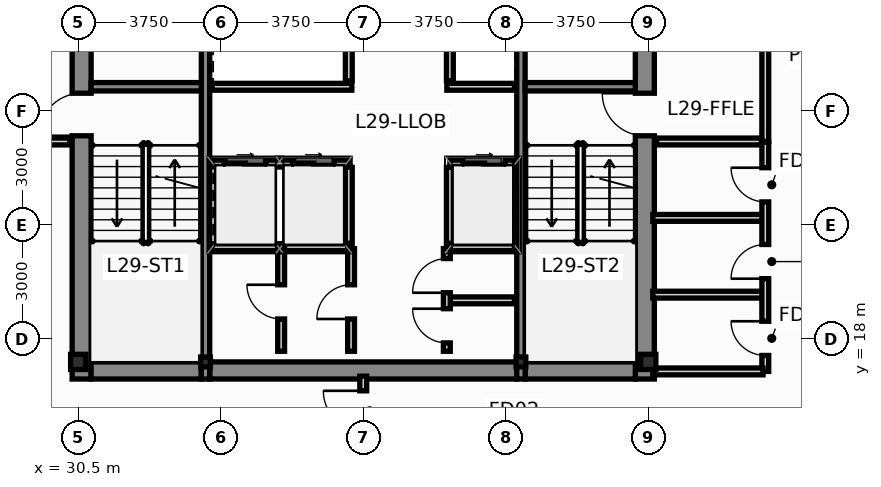
"""IFC4 building model, lengths in metres.
Left out: names, types, materials, properties, quantities, classifications, styles, units other than length and angle.
Written with IfcOpenShell. Run it as: python <this file> out.ifc"""

import sys

from ifc_helpers import new_model, si_unit, direction, frame, frame_2d, origin, origin_2d, place, context, subcontext, project, spatial, rectangle, i_section, extrude, source, transform, mapped, element, fill, save


model = new_model("IFC4")
c1 = context("Model", 3, precision=1e-05, world=origin(), true_north=direction((0.0, 1.0)))
c2 = subcontext(c1, "Body", "Model", "MODEL_VIEW")
j1 = project(units=[si_unit("LENGTHUNIT", "METRE"), si_unit("PLANEANGLEUNIT", "RADIAN")], contexts=[c1])
p1 = place(None, origin())
s1 = spatial("IfcSite", under=j1, at=p1, CompositionType="ELEMENT")
p2 = place(p1, origin())
s2 = spatial("IfcBuilding", under=s1, at=p2, CompositionType="ELEMENT")
p3 = place(p2, frame((0.0, 0.0, 112.7)))
s3 = spatial("IfcBuildingStorey", under=s2, at=p3, CompositionType="ELEMENT", Elevation=112.7)
m1 = source(origin(), c2, "Body", "SweptSolid", [
    extrude(i_section(OverallWidth=0.4, OverallDepth=0.4, WebThickness=0.02, FlangeThickness=0.032, at=origin_2d()), origin(), (0.0, 0.0, 1.0), 3.65),
])
for number, where, z_axis, x_axis in (
    (1, (30.5, 17.4, 0.0), (0.0, 0.0, 1.0), (1.0, 0.0, 0.0)),
    (2, (45.5, 17.4, 0.0), (0.0, 0.0, 1.0), (1.0, 0.0, 0.0)),
):
    element("IfcColumn", number, at=place(p3, frame(where, z_axis=z_axis, x_axis=x_axis)), inside=s3, PredefinedType="COLUMN", context=c2, shape_type="MappedRepresentation", body=[
        mapped(m1, transform((0.0, 0.0, 0.0), scale=1.0)),
    ])
m2 = source(origin(), c2, "Body", "SweptSolid", [
    extrude(i_section(OverallWidth=0.256, OverallDepth=0.26, WebThickness=0.01, FlangeThickness=0.017, at=origin_2d()), origin(), (0.0, 0.0, 1.0), 3.65),
])
for number, where, z_axis, x_axis in (
    (3, (33.85, 17.4, 0.0), (0.0, 0.0, 1.0), (1.0, 0.0, 0.0)),
    (4, (42.15, 17.4, 0.0), (0.0, 0.0, 1.0), (1.0, 0.0, 0.0)),
):
    element("IfcColumn", number, at=place(p3, frame(where, z_axis=z_axis, x_axis=x_axis)), inside=s3, PredefinedType="COLUMN", context=c2, shape_type="MappedRepresentation", body=[
        mapped(m2, transform((0.0, 0.0, 0.0), scale=1.0)),
    ])
p4 = place(p3, frame((30.59, 16.95, 0.0), z_axis=(0.0, 0.0, 1.0), x_axis=(0.0, 1.0, 0.0)))
e5 = element("IfcWall", 5, at=p4, inside=s3, PredefinedType="SHEAR", context=c2, shape_type="SweptSolid", body=[
    extrude(rectangle(XDim=13.275, YDim=0.5, at=frame_2d((6.638, 0.0))), origin(), (0.0, 0.0, 1.0), 3.65),
])
p5 = place(p4, frame((6.4, 0.0, 0.0)))
e6 = element("IfcOpeningElement", 6, at=p5, cuts=e5, PredefinedType="OPENING", context=c2, shape_type="SweptSolid", body=[
    extrude(rectangle(XDim=1.12, YDim=2.15, at=frame_2d((0.56, 1.075))), frame((0.0, 0.262, 0.0), z_axis=(0.0, -1.0, 0.0), x_axis=(1.0, 0.0, 0.0)), (0.0, 0.0, 1.0), 0.524),
])
p6 = place(p4, frame((10.85, 0.0, 0.0)))
e7 = element("IfcOpeningElement", 7, at=p6, cuts=e5, PredefinedType="OPENING", context=c2, shape_type="SweptSolid", body=[
    extrude(rectangle(XDim=1.2, YDim=2.2, at=frame_2d((0.6, 1.1))), frame((0.0, 0.262, 0.0), z_axis=(0.0, -1.0, 0.0), x_axis=(1.0, 0.0, 0.0)), (0.0, 0.0, 1.0), 0.524),
])
p7 = place(p3, frame((45.41, 16.95, 0.0), z_axis=(0.0, 0.0, 1.0), x_axis=(0.0, 1.0, 0.0)))
e8 = element("IfcWall", 8, at=p7, inside=s3, PredefinedType="SHEAR", context=c2, shape_type="SweptSolid", body=[
    extrude(rectangle(XDim=13.275, YDim=0.5, at=frame_2d((6.638, 0.0))), origin(), (0.0, 0.0, 1.0), 3.65),
])
p8 = place(p7, frame((6.4, 0.0, 0.0)))
e9 = element("IfcOpeningElement", 9, at=p8, cuts=e8, PredefinedType="OPENING", context=c2, shape_type="SweptSolid", body=[
    extrude(rectangle(XDim=1.12, YDim=2.15, at=frame_2d((0.56, 1.075))), frame((0.0, 0.262, 0.0), z_axis=(0.0, -1.0, 0.0), x_axis=(1.0, 0.0, 0.0)), (0.0, 0.0, 1.0), 0.524),
])
p9 = place(p7, frame((10.85, 0.0, 0.0)))
e10 = element("IfcOpeningElement", 10, at=p9, cuts=e8, PredefinedType="OPENING", context=c2, shape_type="SweptSolid", body=[
    extrude(rectangle(XDim=1.2, YDim=2.2, at=frame_2d((0.6, 1.1))), frame((0.0, 0.262, 0.0), z_axis=(0.0, -1.0, 0.0), x_axis=(1.0, 0.0, 0.0)), (0.0, 0.0, 1.0), 0.524),
])
p10 = place(p3, frame((30.84, 17.175, 0.0), z_axis=(0.0, 0.0, 1.0), x_axis=(1.0, 0.0, 0.0)))
e11 = element("IfcWall", 11, at=p10, inside=s3, PredefinedType="SHEAR", context=c2, shape_type="SweptSolid", body=[
    extrude(rectangle(XDim=2.9, YDim=0.45, at=frame_2d((1.45, 0.0))), origin(), (0.0, 0.0, 1.0), 3.65),
])
p11 = place(p3, frame((33.96, 17.175, 0.0), z_axis=(0.0, 0.0, 1.0), x_axis=(1.0, 0.0, 0.0)))
e12 = element("IfcWall", 12, at=p11, inside=s3, PredefinedType="SHEAR", context=c2, shape_type="SweptSolid", body=[
    extrude(rectangle(XDim=8.08, YDim=0.45, at=frame_2d((4.04, 0.0))), origin(), (0.0, 0.0, 1.0), 3.65),
])
p12 = place(p3, frame((42.26, 17.175, 0.0), z_axis=(0.0, 0.0, 1.0), x_axis=(1.0, 0.0, 0.0)))
e13 = element("IfcWall", 13, at=p12, inside=s3, PredefinedType="SHEAR", context=c2, shape_type="SweptSolid", body=[
    extrude(rectangle(XDim=2.9, YDim=0.45, at=frame_2d((1.45, 0.0))), origin(), (0.0, 0.0, 1.0), 3.65),
])
for number, where, z_axis, x_axis in (
    (14, (33.85, 16.95, 0.0), (0.0, 0.0, 1.0), (0.0, 1.0, 0.0)),
    (15, (42.15, 16.95, 0.0), (0.0, 0.0, 1.0), (0.0, 1.0, 0.0)),
):
    element("IfcWall", number, at=place(p3, frame(where, z_axis=z_axis, x_axis=x_axis)), inside=s3, PredefinedType="SHEAR", context=c2, shape_type="SweptSolid", body=[
        extrude(rectangle(XDim=13.275, YDim=0.22, at=frame_2d((6.638, 0.0))), origin(), (0.0, 0.0, 1.0), 3.65),
    ])
for number, where, z_axis, x_axis in (
    (16, (30.84, 24.64, 0.0), (0.0, 0.0, 1.0), (1.0, 0.0, 0.0)),
    (17, (42.26, 24.64, 0.0), (0.0, 0.0, 1.0), (1.0, 0.0, 0.0)),
):
    element("IfcWall", number, at=place(p3, frame(where, z_axis=z_axis, x_axis=x_axis)), inside=s3, PredefinedType="SHEAR", context=c2, shape_type="SweptSolid", body=[
        extrude(rectangle(XDim=2.9, YDim=0.22, at=frame_2d((1.45, 0.0))), origin(), (0.0, 0.0, 1.0), 3.65),
    ])
p13 = place(p3, frame((34.02, 22.62, 0.0), z_axis=(0.0, 0.0, 1.0), x_axis=(1.0, 0.0, 0.0)))
e18 = element("IfcWall", 18, at=p13, inside=s3, PredefinedType="PARTITIONING", context=c2, shape_type="SweptSolid", body=[
    extrude(rectangle(XDim=3.6, YDim=0.18, at=frame_2d((1.8, 0.0))), origin(), (0.0, 0.0, 1.0), 3.4),
])
p14 = place(p13, frame((0.32, 0.0, 0.0)))
e19 = element("IfcOpeningElement", 19, at=p14, cuts=e18, PredefinedType="OPENING", context=c2, shape_type="SweptSolid", body=[
    extrude(rectangle(XDim=1.1, YDim=2.2, at=frame_2d((0.55, 1.1))), frame((0.0, 0.102, 0.0), z_axis=(0.0, -1.0, 0.0), x_axis=(1.0, 0.0, 0.0)), (0.0, 0.0, 1.0), 0.204),
])
p15 = place(p13, frame((2.12, 0.0, 0.0)))
e20 = element("IfcOpeningElement", 20, at=p15, cuts=e18, PredefinedType="OPENING", context=c2, shape_type="SweptSolid", body=[
    extrude(rectangle(XDim=1.1, YDim=2.2, at=frame_2d((0.55, 1.1))), frame((0.0, 0.102, 0.0), z_axis=(0.0, -1.0, 0.0), x_axis=(1.0, 0.0, 0.0)), (0.0, 0.0, 1.0), 0.204),
])
p16 = place(p3, frame((40.28, 22.62, 0.0), z_axis=(0.0, 0.0, 1.0), x_axis=(1.0, 0.0, 0.0)))
e21 = element("IfcWall", 21, at=p16, inside=s3, PredefinedType="PARTITIONING", context=c2, shape_type="SweptSolid", body=[
    extrude(rectangle(XDim=1.7, YDim=0.18, at=frame_2d((0.85, 0.0))), origin(), (0.0, 0.0, 1.0), 3.4),
])
p17 = place(p16, frame((0.35, 0.0, 0.0)))
e22 = element("IfcOpeningElement", 22, at=p17, cuts=e21, PredefinedType="OPENING", context=c2, shape_type="SweptSolid", body=[
    extrude(rectangle(XDim=1.1, YDim=2.2, at=frame_2d((0.55, 1.1))), frame((0.0, 0.102, 0.0), z_axis=(0.0, -1.0, 0.0), x_axis=(1.0, 0.0, 0.0)), (0.0, 0.0, 1.0), 0.204),
])
for number, where, z_axis, x_axis in (
    (23, (37.62, 20.52, 0.0), (0.0, 0.0, 1.0), (0.0, 1.0, 0.0)),
    (24, (40.28, 20.52, 0.0), (0.0, 0.0, 1.0), (0.0, 1.0, 0.0)),
    (25, (37.62, 24.8, 0.0), (0.0, 0.0, 1.0), (0.0, 1.0, 0.0)),
    (26, (40.28, 24.8, 0.0), (0.0, 0.0, 1.0), (0.0, 1.0, 0.0)),
):
    element("IfcWall", number, at=place(p3, frame(where, z_axis=z_axis, x_axis=x_axis)), inside=s3, PredefinedType="PARTITIONING", context=c2, shape_type="SweptSolid", body=[
        extrude(rectangle(XDim=2.0, YDim=0.18, at=frame_2d((1.0, 0.0))), origin(), (0.0, 0.0, 1.0), 3.4),
    ])
p18 = place(p3, frame((34.02, 24.64, 0.0), z_axis=(0.0, 0.0, 1.0), x_axis=(1.0, 0.0, 0.0)))
e27 = element("IfcWall", 27, at=p18, inside=s3, PredefinedType="PARTITIONING", context=c2, shape_type="SweptSolid", body=[
    extrude(rectangle(XDim=3.68, YDim=0.18, at=frame_2d((1.84, 0.0))), origin(), (0.0, 0.0, 1.0), 3.4),
])
p19 = place(p3, frame((40.2, 24.64, 0.0), z_axis=(0.0, 0.0, 1.0), x_axis=(1.0, 0.0, 0.0)))
e28 = element("IfcWall", 28, at=p19, inside=s3, PredefinedType="PARTITIONING", context=c2, shape_type="SweptSolid", body=[
    extrude(rectangle(XDim=1.78, YDim=0.18, at=frame_2d((0.89, 0.0))), origin(), (0.0, 0.0, 1.0), 3.4),
])
p20 = place(p3, frame((27.52, 23.2, 0.0), z_axis=(0.0, 0.0, 1.0), x_axis=(1.0, 0.0, 0.0)))
e29 = element("IfcWall", 29, at=p20, inside=s3, PredefinedType="PARTITIONING", context=c2, shape_type="SweptSolid", body=[
    extrude(rectangle(XDim=2.76, YDim=0.18, at=frame_2d((1.38, 0.0))), origin(), (0.0, 0.0, 1.0), 3.4),
])
p21 = place(p3, frame((48.58, 23.2, 0.0), z_axis=(0.0, 0.0, 1.0), x_axis=(0.0, 1.0, 0.0)))
e30 = element("IfcWall", 30, at=p21, inside=s3, PredefinedType="PARTITIONING", context=c2, shape_type="SweptSolid", body=[
    extrude(rectangle(XDim=6.4, YDim=0.18, at=frame_2d((3.2, 0.0))), origin(), (0.0, 0.0, 1.0), 3.026),
])
p22 = place(p21, frame((2.65, 0.0, 0.0)))
e31 = element("IfcOpeningElement", 31, at=p22, cuts=e30, PredefinedType="OPENING", context=c2, shape_type="SweptSolid", body=[
    extrude(rectangle(XDim=1.05, YDim=2.15, at=frame_2d((0.525, 1.075))), frame((0.0, 0.102, 0.0), z_axis=(0.0, -1.0, 0.0), x_axis=(1.0, 0.0, 0.0)), (0.0, 0.0, 1.0), 0.204),
])
p23 = place(p3, frame((45.72, 23.2, 0.0), z_axis=(0.0, 0.0, 1.0), x_axis=(1.0, 0.0, 0.0)))
e32 = element("IfcWall", 32, at=p23, inside=s3, PredefinedType="PARTITIONING", context=c2, shape_type="SweptSolid", body=[
    extrude(rectangle(XDim=2.76, YDim=0.18, at=frame_2d((1.38, 0.0))), origin(), (0.0, 0.0, 1.0), 3.4),
])
p24 = place(p3, frame((34.02, 20.42, 0.0), z_axis=(0.0, 0.0, 1.0), x_axis=(1.0, 0.0, 0.0)))
e33 = element("IfcWall", 33, at=p24, inside=s3, PredefinedType="PARTITIONING", context=c2, shape_type="SweptSolid", body=[
    extrude(rectangle(XDim=3.64, YDim=0.18, at=frame_2d((1.82, 0.0))), origin(), (0.0, 0.0, 1.0), 3.4),
])
p25 = place(p3, frame((40.22, 20.42, 0.0), z_axis=(0.0, 0.0, 1.0), x_axis=(1.0, 0.0, 0.0)))
e34 = element("IfcWall", 34, at=p25, inside=s3, PredefinedType="PARTITIONING", context=c2, shape_type="SweptSolid", body=[
    extrude(rectangle(XDim=1.76, YDim=0.18, at=frame_2d((0.88, 0.0))), origin(), (0.0, 0.0, 1.0), 3.4),
])
p26 = place(p3, frame((35.84, 17.68, 0.0), z_axis=(0.0, 0.0, 1.0), x_axis=(0.0, 1.0, 0.0)))
e35 = element("IfcWall", 35, at=p26, inside=s3, PredefinedType="PARTITIONING", context=c2, shape_type="SweptSolid", body=[
    extrude(rectangle(XDim=2.7, YDim=0.18, at=frame_2d((1.35, 0.0))), origin(), (0.0, 0.0, 1.0), 3.4),
])
p27 = place(p26, frame((0.85, 0.0, 0.0)))
e36 = element("IfcOpeningElement", 36, at=p27, cuts=e35, PredefinedType="OPENING", context=c2, shape_type="SweptSolid", body=[
    extrude(rectangle(XDim=0.9, YDim=2.1, at=frame_2d((0.45, 1.05))), frame((0.0, 0.102, 0.0), z_axis=(0.0, -1.0, 0.0), x_axis=(1.0, 0.0, 0.0)), (0.0, 0.0, 1.0), 0.204),
])
p28 = place(p3, frame((37.68, 17.68, 0.0), z_axis=(0.0, 0.0, 1.0), x_axis=(0.0, 1.0, 0.0)))
e37 = element("IfcWall", 37, at=p28, inside=s3, PredefinedType="PARTITIONING", context=c2, shape_type="SweptSolid", body=[
    extrude(rectangle(XDim=2.7, YDim=0.18, at=frame_2d((1.35, 0.0))), origin(), (0.0, 0.0, 1.0), 3.4),
])
p29 = place(p28, frame((0.85, 0.0, 0.0)))
e38 = element("IfcOpeningElement", 38, at=p29, cuts=e37, PredefinedType="OPENING", context=c2, shape_type="SweptSolid", body=[
    extrude(rectangle(XDim=0.9, YDim=2.1, at=frame_2d((0.45, 1.05))), frame((0.0, 0.102, 0.0), z_axis=(0.0, -1.0, 0.0), x_axis=(1.0, 0.0, 0.0)), (0.0, 0.0, 1.0), 0.204),
])
p30 = place(p3, frame((40.28, 19.02, 0.0), z_axis=(0.0, 0.0, 1.0), x_axis=(1.0, 0.0, 0.0)))
e39 = element("IfcWall", 39, at=p30, inside=s3, PredefinedType="PARTITIONING", context=c2, shape_type="SweptSolid", body=[
    extrude(rectangle(XDim=1.7, YDim=0.18, at=frame_2d((0.85, 0.0))), origin(), (0.0, 0.0, 1.0), 3.4),
])
p31 = place(p3, frame((40.2, 17.68, 0.0), z_axis=(0.0, 0.0, 1.0), x_axis=(0.0, 1.0, 0.0)))
e40 = element("IfcWall", 40, at=p31, inside=s3, PredefinedType="PARTITIONING", context=c2, shape_type="SweptSolid", body=[
    extrude(rectangle(XDim=2.7, YDim=0.18, at=frame_2d((1.35, 0.0))), origin(), (0.0, 0.0, 1.0), 3.4),
])
p32 = place(p31, frame((0.22, 0.0, 0.0)))
e41 = element("IfcOpeningElement", 41, at=p32, cuts=e40, PredefinedType="OPENING", context=c2, shape_type="SweptSolid", body=[
    extrude(rectangle(XDim=0.9, YDim=2.1, at=frame_2d((0.45, 1.05))), frame((0.0, 0.102, 0.0), z_axis=(0.0, -1.0, 0.0), x_axis=(1.0, 0.0, 0.0)), (0.0, 0.0, 1.0), 0.204),
])
p33 = place(p31, frame((1.54, 0.0, 0.0)))
e42 = element("IfcOpeningElement", 42, at=p33, cuts=e40, PredefinedType="OPENING", context=c2, shape_type="SweptSolid", body=[
    extrude(rectangle(XDim=0.9, YDim=2.1, at=frame_2d((0.45, 1.05))), frame((0.0, 0.102, 0.0), z_axis=(0.0, -1.0, 0.0), x_axis=(1.0, 0.0, 0.0)), (0.0, 0.0, 1.0), 0.204),
])
for number, where, z_axis, x_axis in (
    (43, (45.62, 19.17, 0.0), (0.0, 0.0, 1.0), (1.0, 0.0, 0.0)),
    (44, (45.62, 21.19, 0.0), (0.0, 0.0, 1.0), (1.0, 0.0, 0.0)),
):
    element("IfcWall", number, at=place(p3, frame(where, z_axis=z_axis, x_axis=x_axis)), inside=s3, PredefinedType="PARTITIONING", context=c2, shape_type="SweptSolid", body=[
        extrude(rectangle(XDim=2.9, YDim=0.18, at=frame_2d((1.45, 0.0))), origin(), (0.0, 0.0, 1.0), 3.4),
    ])
p34 = place(p3, frame((48.58, 17.15, 0.0), z_axis=(0.0, 0.0, 1.0), x_axis=(0.0, 1.0, 0.0)))
e45 = element("IfcWall", 45, at=p34, inside=s3, PredefinedType="PARTITIONING", context=c2, shape_type="SweptSolid", body=[
    extrude(rectangle(XDim=6.03, YDim=0.18, at=frame_2d((3.015, 0.0))), origin(), (0.0, 0.0, 1.0), 3.4),
])
p35 = place(p34, frame((0.42, 0.0, 0.0)))
e46 = element("IfcOpeningElement", 46, at=p35, cuts=e45, PredefinedType="OPENING", context=c2, shape_type="SweptSolid", body=[
    extrude(rectangle(XDim=0.9, YDim=2.1, at=frame_2d((0.45, 1.05))), frame((0.0, 0.102, 0.0), z_axis=(0.0, -1.0, 0.0), x_axis=(1.0, 0.0, 0.0)), (0.0, 0.0, 1.0), 0.204),
])
p36 = place(p34, frame((2.44, 0.0, 0.0)))
e47 = element("IfcOpeningElement", 47, at=p36, cuts=e45, PredefinedType="OPENING", context=c2, shape_type="SweptSolid", body=[
    extrude(rectangle(XDim=0.9, YDim=2.1, at=frame_2d((0.45, 1.05))), frame((0.0, 0.102, 0.0), z_axis=(0.0, -1.0, 0.0), x_axis=(1.0, 0.0, 0.0)), (0.0, 0.0, 1.0), 0.204),
])
p37 = place(p34, frame((4.46, 0.0, 0.0)))
e48 = element("IfcOpeningElement", 48, at=p37, cuts=e45, PredefinedType="OPENING", context=c2, shape_type="SweptSolid", body=[
    extrude(rectangle(XDim=0.9, YDim=2.1, at=frame_2d((0.45, 1.05))), frame((0.0, 0.102, 0.0), z_axis=(0.0, -1.0, 0.0), x_axis=(1.0, 0.0, 0.0)), (0.0, 0.0, 1.0), 0.204),
])
p38 = place(p3, frame((45.62, 17.15, 0.0), z_axis=(0.0, 0.0, 1.0), x_axis=(1.0, 0.0, 0.0)))
e49 = element("IfcWall", 49, at=p38, inside=s3, PredefinedType="PARTITIONING", context=c2, shape_type="SweptSolid", body=[
    extrude(rectangle(XDim=2.9, YDim=0.18, at=frame_2d((1.45, 0.0))), origin(), (0.0, 0.0, 1.0), 2.783),
])
p39 = place(p3, frame((38.0, 15.205, 0.0), z_axis=(0.0, 0.0, 1.0), x_axis=(0.0, 1.0, 0.0)))
e50 = element("IfcWall", 50, at=p39, inside=s3, PredefinedType="PARTITIONING", context=c2, shape_type="SweptSolid", body=[
    extrude(rectangle(XDim=1.82, YDim=0.18, at=frame_2d((0.91, 0.0))), origin(), (0.0, 0.0, 1.0), 3.4),
])
p40 = place(p39, frame((0.385, 0.0, 0.0)))
e51 = element("IfcOpeningElement", 51, at=p40, cuts=e50, PredefinedType="OPENING", context=c2, shape_type="SweptSolid", body=[
    extrude(rectangle(XDim=1.05, YDim=2.15, at=frame_2d((0.525, 1.075))), frame((0.0, 0.102, 0.0), z_axis=(0.0, -1.0, 0.0), x_axis=(1.0, 0.0, 0.0)), (0.0, 0.0, 1.0), 0.204),
])
p41 = place(p5, origin())
e52 = element("IfcDoor", 52, at=p41, inside=s3, OperationType="SINGLE_SWING_LEFT", PredefinedType="DOOR", context=c2, shape_type="SweptSolid", body=[
    extrude(rectangle(XDim=1.12, YDim=2.15, at=frame_2d((0.56, 1.075))), frame((0.0, 0.025, 0.0), z_axis=(0.0, -1.0, 0.0), x_axis=(1.0, 0.0, 0.0)), (0.0, 0.0, 1.0), 0.05),
])
fill(e6, e52)
p42 = place(p8, origin())
e53 = element("IfcDoor", 53, at=p42, inside=s3, OperationType="SINGLE_SWING_RIGHT", PredefinedType="DOOR", context=c2, shape_type="SweptSolid", body=[
    extrude(rectangle(XDim=1.12, YDim=2.15, at=frame_2d((0.56, 1.075))), frame((0.0, 0.025, 0.0), z_axis=(0.0, -1.0, 0.0), x_axis=(1.0, 0.0, 0.0)), (0.0, 0.0, 1.0), 0.05),
])
fill(e9, e53)
p43 = place(p14, origin())
e54 = element("IfcDoor", 54, at=p43, inside=s3, OperationType="SLIDING_TO_LEFT", PredefinedType="DOOR", context=c2, shape_type="SweptSolid", body=[
    extrude(rectangle(XDim=1.1, YDim=2.2, at=frame_2d((0.55, 1.1))), frame((0.0, 0.025, 0.0), z_axis=(0.0, -1.0, 0.0), x_axis=(1.0, 0.0, 0.0)), (0.0, 0.0, 1.0), 0.05),
])
fill(e19, e54)
p44 = place(p15, origin())
e55 = element("IfcDoor", 55, at=p44, inside=s3, OperationType="SLIDING_TO_RIGHT", PredefinedType="DOOR", context=c2, shape_type="SweptSolid", body=[
    extrude(rectangle(XDim=1.1, YDim=2.2, at=frame_2d((0.55, 1.1))), frame((0.0, 0.025, 0.0), z_axis=(0.0, -1.0, 0.0), x_axis=(1.0, 0.0, 0.0)), (0.0, 0.0, 1.0), 0.05),
])
fill(e20, e55)
p45 = place(p17, origin())
e56 = element("IfcDoor", 56, at=p45, inside=s3, OperationType="SLIDING_TO_LEFT", PredefinedType="DOOR", context=c2, shape_type="SweptSolid", body=[
    extrude(rectangle(XDim=1.1, YDim=2.2, at=frame_2d((0.55, 1.1))), frame((0.0, 0.025, 0.0), z_axis=(0.0, -1.0, 0.0), x_axis=(1.0, 0.0, 0.0)), (0.0, 0.0, 1.0), 0.05),
])
fill(e22, e56)
p46 = place(p27, origin())
e57 = element("IfcDoor", 57, at=p46, inside=s3, OperationType="SINGLE_SWING_RIGHT", PredefinedType="DOOR", context=c2, shape_type="SweptSolid", body=[
    extrude(rectangle(XDim=0.9, YDim=2.1, at=frame_2d((0.45, 1.05))), frame((0.0, 0.025, 0.0), z_axis=(0.0, -1.0, 0.0), x_axis=(1.0, 0.0, 0.0)), (0.0, 0.0, 1.0), 0.05),
])
fill(e36, e57)
p47 = place(p29, origin())
e58 = element("IfcDoor", 58, at=p47, inside=s3, OperationType="SINGLE_SWING_LEFT", PredefinedType="DOOR", context=c2, shape_type="SweptSolid", body=[
    extrude(rectangle(XDim=0.9, YDim=2.1, at=frame_2d((0.45, 1.05))), frame((0.0, 0.025, 0.0), z_axis=(0.0, -1.0, 0.0), x_axis=(1.0, 0.0, 0.0)), (0.0, 0.0, 1.0), 0.05),
])
fill(e38, e58)
p48 = place(p32, origin())
e59 = element("IfcDoor", 59, at=p48, inside=s3, OperationType="SINGLE_SWING_RIGHT", PredefinedType="DOOR", context=c2, shape_type="SweptSolid", body=[
    extrude(rectangle(XDim=0.9, YDim=2.1, at=frame_2d((0.45, 1.05))), frame((0.0, 0.025, 0.0), z_axis=(0.0, -1.0, 0.0), x_axis=(1.0, 0.0, 0.0)), (0.0, 0.0, 1.0), 0.05),
])
fill(e41, e59)
p49 = place(p33, origin())
e60 = element("IfcDoor", 60, at=p49, inside=s3, OperationType="SINGLE_SWING_LEFT", PredefinedType="DOOR", context=c2, shape_type="SweptSolid", body=[
    extrude(rectangle(XDim=0.9, YDim=2.1, at=frame_2d((0.45, 1.05))), frame((0.0, 0.025, 0.0), z_axis=(0.0, -1.0, 0.0), x_axis=(1.0, 0.0, 0.0)), (0.0, 0.0, 1.0), 0.05),
])
fill(e42, e60)
p50 = place(p35, origin())
e61 = element("IfcDoor", 61, at=p50, inside=s3, OperationType="SINGLE_SWING_RIGHT", PredefinedType="DOOR", context=c2, shape_type="SweptSolid", body=[
    extrude(rectangle(XDim=0.9, YDim=2.1, at=frame_2d((0.45, 1.05))), frame((0.0, 0.025, 0.0), z_axis=(0.0, -1.0, 0.0), x_axis=(1.0, 0.0, 0.0)), (0.0, 0.0, 1.0), 0.05),
])
fill(e46, e61)
p51 = place(p36, origin())
e62 = element("IfcDoor", 62, at=p51, inside=s3, OperationType="SINGLE_SWING_LEFT", PredefinedType="DOOR", context=c2, shape_type="SweptSolid", body=[
    extrude(rectangle(XDim=0.9, YDim=2.1, at=frame_2d((0.45, 1.05))), frame((0.0, 0.025, 0.0), z_axis=(0.0, -1.0, 0.0), x_axis=(1.0, 0.0, 0.0)), (0.0, 0.0, 1.0), 0.05),
])
fill(e47, e62)
p52 = place(p37, origin())
e63 = element("IfcDoor", 63, at=p52, inside=s3, OperationType="SINGLE_SWING_RIGHT", PredefinedType="DOOR", context=c2, shape_type="SweptSolid", body=[
    extrude(rectangle(XDim=0.9, YDim=2.1, at=frame_2d((0.45, 1.05))), frame((0.0, 0.025, 0.0), z_axis=(0.0, -1.0, 0.0), x_axis=(1.0, 0.0, 0.0)), (0.0, 0.0, 1.0), 0.05),
])
fill(e48, e63)
p53 = place(p40, origin())
e64 = element("IfcDoor", 64, at=p53, inside=s3, OperationType="SINGLE_SWING_RIGHT", PredefinedType="DOOR", context=c2, shape_type="SweptSolid", body=[
    extrude(rectangle(XDim=1.05, YDim=2.15, at=frame_2d((0.525, 1.075))), frame((0.0, 0.025, 0.0), z_axis=(0.0, -1.0, 0.0), x_axis=(1.0, 0.0, 0.0)), (0.0, 0.0, 1.0), 0.05),
])
fill(e51, e64)
save(model, sys.argv[1])
